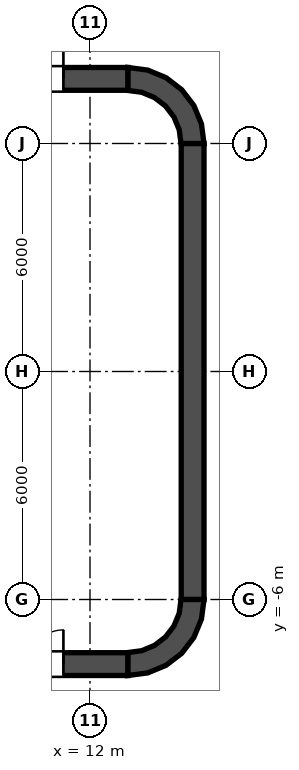
"""IFC4 building model, lengths in metres.
Left out: names, types, materials, properties, quantities, classifications, styles, units other than length and angle.
Written with IfcOpenShell. Run it as: python <this file> out.ifc"""

import sys

from ifc_helpers import new_model, si_unit, direction, frame, frame_2d, origin, place, context, subcontext, project, spatial, polyline, rectangle, outline, extrude, element, fill, save


model = new_model("IFC4")
c1 = context("Model", 3, precision=1e-05, world=origin(), true_north=direction((0.0, 1.0)))
c2 = subcontext(c1, "Body", "Model", "MODEL_VIEW")
j1 = project(units=[si_unit("LENGTHUNIT", "METRE"), si_unit("PLANEANGLEUNIT", "RADIAN")], contexts=[c1])
p1 = place(None, origin())
s1 = spatial("IfcSite", under=j1, at=p1, CompositionType="ELEMENT")
p2 = place(p1, origin())
s2 = spatial("IfcBuilding", under=s1, at=p2, CompositionType="ELEMENT")
p3 = place(p2, frame((0.0, 0.0, 110.4)))
s3 = spatial("IfcBuildingStorey", under=s2, at=p3, CompositionType="ELEMENT", Elevation=110.4)
p4 = place(p3, frame((-13.0, 7.7, 0.0), z_axis=(0.0, 0.0, 1.0), x_axis=(1.0, 0.0, 0.0)))
e1 = element("IfcWall", 1, at=p4, inside=s3, PredefinedType="SHEAR", context=c2, shape_type="SweptSolid", body=[
    extrude(rectangle(XDim=26.0, YDim=0.6, at=frame_2d((13.0, 0.0))), origin(), (0.0, 0.0, 1.0), 4.2),
])
p5 = place(p4, frame((1.7, 0.0, 0.0)))
e2 = element("IfcOpeningElement", 2, at=p5, cuts=e1, PredefinedType="OPENING", context=c2, shape_type="SweptSolid", body=[
    extrude(rectangle(XDim=1.8, YDim=2.1, at=frame_2d((0.9, 1.05))), frame((0.0, 0.3, 0.0), z_axis=(0.0, -1.0, 0.0), x_axis=(1.0, 0.0, 0.0)), (0.0, 0.0, 1.0), 0.6),
])
p6 = place(p4, frame((22.5, 0.0, 0.0)))
e3 = element("IfcOpeningElement", 3, at=p6, cuts=e1, PredefinedType="OPENING", context=c2, shape_type="SweptSolid", body=[
    extrude(rectangle(XDim=1.8, YDim=2.1, at=frame_2d((0.9, 1.05))), frame((0.0, 0.3, 0.0), z_axis=(0.0, -1.0, 0.0), x_axis=(1.0, 0.0, 0.0)), (0.0, 0.0, 1.0), 0.6),
])
p7 = place(p3, frame((-13.0, -7.7, 0.0), z_axis=(0.0, 0.0, 1.0), x_axis=(1.0, 0.0, 0.0)))
e4 = element("IfcWall", 4, at=p7, inside=s3, PredefinedType="SHEAR", context=c2, shape_type="SweptSolid", body=[
    extrude(rectangle(XDim=26.0, YDim=0.6, at=frame_2d((13.0, 0.0))), origin(), (0.0, 0.0, 1.0), 4.2),
])
p8 = place(p7, frame((1.7, 0.0, 0.0)))
e5 = element("IfcOpeningElement", 5, at=p8, cuts=e4, PredefinedType="OPENING", context=c2, shape_type="SweptSolid", body=[
    extrude(rectangle(XDim=1.8, YDim=2.1, at=frame_2d((0.9, 1.05))), frame((0.0, 0.3, 0.0), z_axis=(0.0, -1.0, 0.0), x_axis=(1.0, 0.0, 0.0)), (0.0, 0.0, 1.0), 0.6),
])
p9 = place(p7, frame((22.5, 0.0, 0.0)))
e6 = element("IfcOpeningElement", 6, at=p9, cuts=e4, PredefinedType="OPENING", context=c2, shape_type="SweptSolid", body=[
    extrude(rectangle(XDim=1.8, YDim=2.1, at=frame_2d((0.9, 1.05))), frame((0.0, 0.3, 0.0), z_axis=(0.0, -1.0, 0.0), x_axis=(1.0, 0.0, 0.0)), (0.0, 0.0, 1.0), 0.6),
])
p10 = place(p3, frame((14.7, -6.0, 0.0), z_axis=(0.0, 0.0, 1.0), x_axis=(0.0, 1.0, 0.0)))
e7 = element("IfcWall", 7, at=p10, inside=s3, PredefinedType="SHEAR", context=c2, shape_type="SweptSolid", body=[
    extrude(rectangle(XDim=12.0, YDim=0.6, at=frame_2d((6.0, 0.0))), origin(), (0.0, 0.0, 1.0), 4.2),
])
p11 = place(p3, origin())
e8 = element("IfcWall", 8, at=p11, inside=s3, PredefinedType="SHEAR", context=c2, shape_type="SweptSolid", body=[
    extrude(outline(polyline([(13.0, 8.0), (13.0, 7.395), (13.361, 7.347), (13.698, 7.208), (13.986, 6.986), (14.208, 6.698), (14.347, 6.361), (14.395, 6.0), (15.0, 6.0), (14.932, 6.518), (14.732, 7.0), (14.414, 7.414), (14.0, 7.732), (13.518, 7.932), (13.0, 8.0)])), origin(), (0.0, 0.0, 1.0), 4.2),
])
e9 = element("IfcWall", 9, at=p11, inside=s3, PredefinedType="SHEAR", context=c2, shape_type="SweptSolid", body=[
    extrude(outline(polyline([(15.0, -6.0), (14.395, -6.0), (14.347, -6.361), (14.208, -6.698), (13.986, -6.986), (13.698, -7.208), (13.361, -7.347), (13.0, -7.395), (13.0, -8.0), (13.518, -7.932), (14.0, -7.732), (14.414, -7.414), (14.732, -7.0), (14.932, -6.518), (15.0, -6.0)])), origin(), (0.0, 0.0, 1.0), 4.2),
])
p12 = place(p3, frame((11.8, -7.4, 0.0), z_axis=(0.0, 0.0, 1.0), x_axis=(0.0, 1.0, 0.0)))
e10 = element("IfcWall", 10, at=p12, inside=s3, PredefinedType="SOLIDWALL", context=c2, shape_type="SweptSolid", body=[
    extrude(rectangle(XDim=14.8, YDim=0.4, at=frame_2d((7.4, 0.0))), origin(), (0.0, 0.0, 1.0), 4.05),
])
p13 = place(p12, frame((11.2, 0.0, 0.0)))
e11 = element("IfcOpeningElement", 11, at=p13, cuts=e10, PredefinedType="OPENING", context=c2, shape_type="SweptSolid", body=[
    extrude(rectangle(XDim=1.1, YDim=2.1, at=frame_2d((0.55, 1.05))), frame((0.0, 0.2, 0.0), z_axis=(0.0, -1.0, 0.0), x_axis=(1.0, 0.0, 0.0)), (0.0, 0.0, 1.0), 0.4),
])
p14 = place(p12, frame((8.3, 0.0, 0.0)))
e12 = element("IfcOpeningElement", 12, at=p14, cuts=e10, PredefinedType="OPENING", context=c2, shape_type="SweptSolid", body=[
    extrude(rectangle(XDim=1.1, YDim=2.1, at=frame_2d((0.55, 1.05))), frame((0.0, 0.2, 0.0), z_axis=(0.0, -1.0, 0.0), x_axis=(1.0, 0.0, 0.0)), (0.0, 0.0, 1.0), 0.4),
])
p15 = place(p12, frame((5.4, 0.0, 0.0)))
e13 = element("IfcOpeningElement", 13, at=p15, cuts=e10, PredefinedType="OPENING", context=c2, shape_type="SweptSolid", body=[
    extrude(rectangle(XDim=1.1, YDim=2.1, at=frame_2d((0.55, 1.05))), frame((0.0, 0.2, 0.0), z_axis=(0.0, -1.0, 0.0), x_axis=(1.0, 0.0, 0.0)), (0.0, 0.0, 1.0), 0.4),
])
p16 = place(p12, frame((13.552, 0.0, 0.0)))
e14 = element("IfcOpeningElement", 14, at=p16, cuts=e10, PredefinedType="OPENING", context=c2, shape_type="SweptSolid", body=[
    extrude(rectangle(XDim=0.9, YDim=2.1, at=frame_2d((0.45, 1.05))), frame((0.0, 0.2, 0.0), z_axis=(0.0, -1.0, 0.0), x_axis=(1.0, 0.0, 0.0)), (0.0, 0.0, 1.0), 0.4),
])
p17 = place(p12, frame((0.347, 0.0, 0.0)))
e15 = element("IfcOpeningElement", 15, at=p17, cuts=e10, PredefinedType="OPENING", context=c2, shape_type="SweptSolid", body=[
    extrude(rectangle(XDim=0.9, YDim=2.1, at=frame_2d((0.45, 1.05))), frame((0.0, 0.2, 0.0), z_axis=(0.0, -1.0, 0.0), x_axis=(1.0, 0.0, 0.0)), (0.0, 0.0, 1.0), 0.4),
])
e16 = element("IfcWall", 16, at=p11, inside=s3, PredefinedType="SOLIDWALL", context=c2, shape_type="SweptSolid", body=[
    extrude(outline(polyline([(12.0, -5.675), (12.0, -5.925), (14.15, -5.925), (14.4, -5.925), (14.4, -5.675), (14.4, -3.025), (14.4, -2.775), (14.4, -0.125), (14.4, 0.125), (14.4, 2.775), (14.4, 3.025), (14.4, 5.675), (14.4, 5.925), (14.15, 5.925), (12.0, 5.925), (12.0, 5.675), (14.15, 5.675), (14.15, 3.025), (12.0, 3.025), (12.0, 2.775), (14.15, 2.775), (14.15, 0.125), (12.0, 0.125), (12.0, -0.125), (14.15, -0.125), (14.15, -2.775), (12.0, -2.775), (12.0, -3.025), (14.15, -3.025), (14.15, -5.675), (12.0, -5.675)])), origin(), (0.0, 0.0, 1.0), 4.05),
])
p18 = place(p13, origin())
e17 = element("IfcDoor", 17, at=p18, inside=s3, OperationType="DOUBLE_DOOR_SLIDING", PredefinedType="DOOR", context=c2, shape_type="SweptSolid", body=[
    extrude(rectangle(XDim=1.1, YDim=2.1, at=frame_2d((0.55, 1.05))), frame((0.0, 0.025, 0.0), z_axis=(0.0, -1.0, 0.0), x_axis=(1.0, 0.0, 0.0)), (0.0, 0.0, 1.0), 0.05),
])
fill(e11, e17)
p19 = place(p14, origin())
e18 = element("IfcDoor", 18, at=p19, inside=s3, OperationType="DOUBLE_DOOR_SLIDING", PredefinedType="DOOR", context=c2, shape_type="SweptSolid", body=[
    extrude(rectangle(XDim=1.1, YDim=2.1, at=frame_2d((0.55, 1.05))), frame((0.0, 0.025, 0.0), z_axis=(0.0, -1.0, 0.0), x_axis=(1.0, 0.0, 0.0)), (0.0, 0.0, 1.0), 0.05),
])
fill(e12, e18)
p20 = place(p15, origin())
e19 = element("IfcDoor", 19, at=p20, inside=s3, OperationType="DOUBLE_DOOR_SLIDING", PredefinedType="DOOR", context=c2, shape_type="SweptSolid", body=[
    extrude(rectangle(XDim=1.1, YDim=2.1, at=frame_2d((0.55, 1.05))), frame((0.0, 0.025, 0.0), z_axis=(0.0, -1.0, 0.0), x_axis=(1.0, 0.0, 0.0)), (0.0, 0.0, 1.0), 0.05),
])
fill(e13, e19)
p21 = place(p16, origin())
e20 = element("IfcDoor", 20, at=p21, inside=s3, OperationType="SINGLE_SWING_RIGHT", PredefinedType="DOOR", context=c2, shape_type="SweptSolid", body=[
    extrude(rectangle(XDim=0.9, YDim=2.1, at=frame_2d((0.45, 1.05))), frame((0.0, 0.025, 0.0), z_axis=(0.0, -1.0, 0.0), x_axis=(1.0, 0.0, 0.0)), (0.0, 0.0, 1.0), 0.05),
])
fill(e14, e20)
p22 = place(p17, origin())
e21 = element("IfcDoor", 21, at=p22, inside=s3, OperationType="SINGLE_SWING_RIGHT", PredefinedType="DOOR", context=c2, shape_type="SweptSolid", body=[
    extrude(rectangle(XDim=0.9, YDim=2.1, at=frame_2d((0.45, 1.05))), frame((0.0, 0.025, 0.0), z_axis=(0.0, -1.0, 0.0), x_axis=(1.0, 0.0, 0.0)), (0.0, 0.0, 1.0), 0.05),
])
fill(e15, e21)
p23 = place(p6, origin())
e22 = element("IfcDoor", 22, at=p23, inside=s3, OperationType="DOUBLE_DOOR_SINGLE_SWING", PredefinedType="DOOR", context=c2, shape_type="SweptSolid", body=[
    extrude(rectangle(XDim=1.8, YDim=2.1, at=frame_2d((0.9, 1.05))), frame((0.0, 0.025, 0.0), z_axis=(0.0, -1.0, 0.0), x_axis=(1.0, 0.0, 0.0)), (0.0, 0.0, 1.0), 0.05),
])
fill(e3, e22)
p24 = place(p9, origin())
e23 = element("IfcDoor", 23, at=p24, inside=s3, OperationType="DOUBLE_DOOR_SINGLE_SWING", PredefinedType="DOOR", context=c2, shape_type="SweptSolid", body=[
    extrude(rectangle(XDim=1.8, YDim=2.1, at=frame_2d((0.9, 1.05))), frame((0.0, 0.025, 0.0), z_axis=(0.0, -1.0, 0.0), x_axis=(1.0, 0.0, 0.0)), (0.0, 0.0, 1.0), 0.05),
])
fill(e6, e23)
save(model, sys.argv[1])
